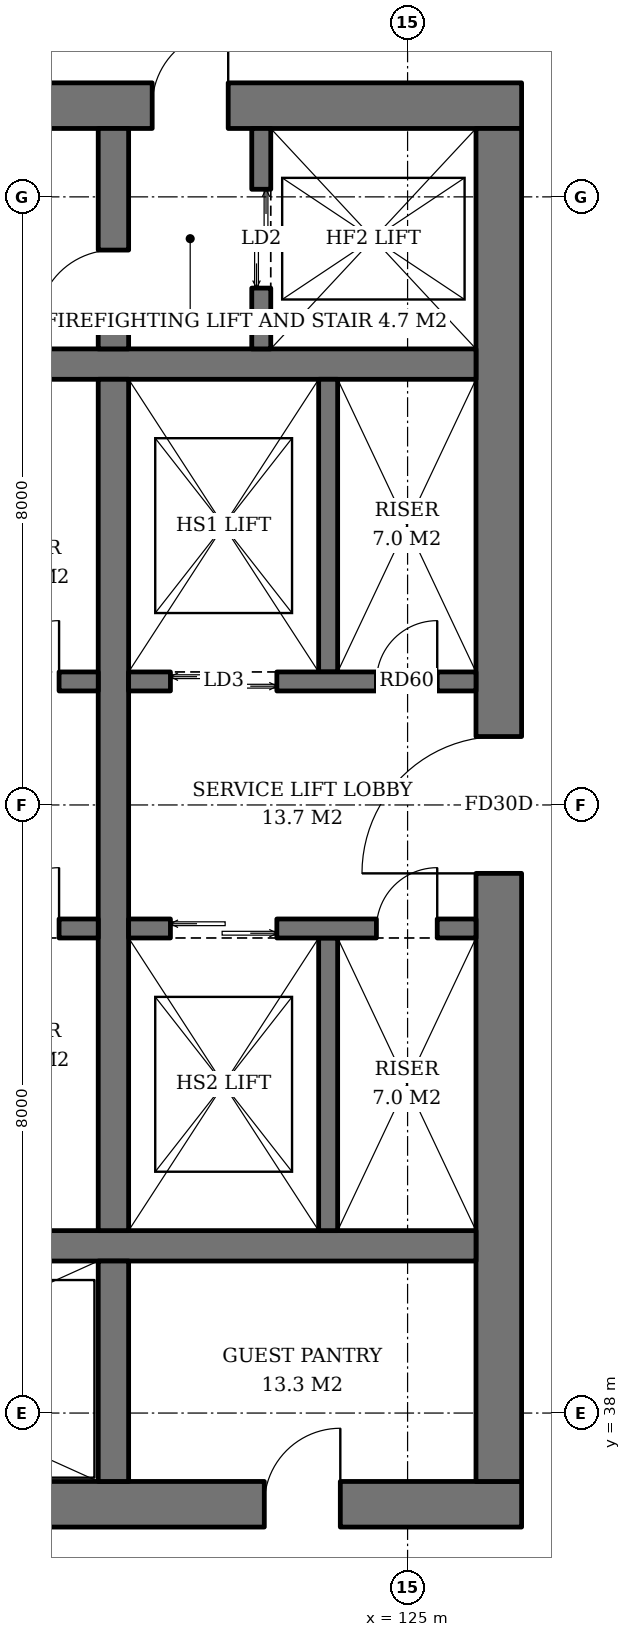
"""IFC4 building model, lengths in metres.
Left out: names, types, materials, properties, quantities, classifications, styles, units other than length and angle.
Written with IfcOpenShell. Run it as: python <this file> out.ifc"""

import sys

from ifc_helpers import new_model, si_unit, direction, frame, frame_2d, origin, place, context, subcontext, project, spatial, rectangle, extrude, element, fill, save


model = new_model("IFC4")
c1 = context("Model", 3, precision=1e-05, world=origin(), true_north=direction((0.0, 1.0)))
c2 = subcontext(c1, "Body", "Model", "MODEL_VIEW")
j1 = project(units=[si_unit("LENGTHUNIT", "METRE"), si_unit("PLANEANGLEUNIT", "RADIAN")], contexts=[c1])
p1 = place(None, origin())
s1 = spatial("IfcSite", under=j1, at=p1, CompositionType="ELEMENT")
p2 = place(p1, origin())
s2 = spatial("IfcBuilding", under=s1, at=p2, CompositionType="ELEMENT")
p3 = place(p2, frame((0.0, 0.0, 21.0)))
s3 = spatial("IfcBuildingStorey", under=s2, at=p3, CompositionType="ELEMENT", Elevation=21.0)
p4 = place(p3, frame((107.5, 36.8, 0.0), z_axis=(0.0, 0.0, 1.0), x_axis=(1.0, 0.0, 0.0)))
e1 = element("IfcWall", 1, at=p4, inside=s3, PredefinedType="SHEAR", context=c2, shape_type="SweptSolid", body=[
    extrude(rectangle(XDim=19.0, YDim=0.6, at=frame_2d((9.5, 0.0))), origin(), (0.0, 0.0, 1.0), 3.8),
])
p5 = place(p4, frame((3.9, 0.0, 0.0)))
e2 = element("IfcOpeningElement", 2, at=p5, cuts=e1, PredefinedType="OPENING", context=c2, shape_type="SweptSolid", body=[
    extrude(rectangle(XDim=1.0, YDim=2.1, at=frame_2d((0.5, 1.05))), frame((0.0, 0.31, 0.0), z_axis=(0.0, -1.0, 0.0), x_axis=(1.0, 0.0, 0.0)), (0.0, 0.0, 1.0), 0.62),
])
p6 = place(p4, frame((15.615, 0.0, 0.0)))
e3 = element("IfcOpeningElement", 3, at=p6, cuts=e1, PredefinedType="OPENING", context=c2, shape_type="SweptSolid", body=[
    extrude(rectangle(XDim=1.0, YDim=2.1, at=frame_2d((0.5, 1.05))), frame((0.0, 0.31, 0.0), z_axis=(0.0, -1.0, 0.0), x_axis=(1.0, 0.0, 0.0)), (0.0, 0.0, 1.0), 0.62),
])
p7 = place(p3, frame((107.5, 55.2, 0.0), z_axis=(0.0, 0.0, 1.0), x_axis=(1.0, 0.0, 0.0)))
e4 = element("IfcWall", 4, at=p7, inside=s3, PredefinedType="SHEAR", context=c2, shape_type="SweptSolid", body=[
    extrude(rectangle(XDim=19.0, YDim=0.6, at=frame_2d((9.5, 0.0))), origin(), (0.0, 0.0, 1.0), 3.8),
])
p8 = place(p7, frame((14.14, 0.0, 0.0)))
e5 = element("IfcOpeningElement", 5, at=p8, cuts=e4, PredefinedType="OPENING", context=c2, shape_type="SweptSolid", body=[
    extrude(rectangle(XDim=1.0, YDim=2.1, at=frame_2d((0.5, 1.05))), frame((0.0, 0.31, 0.0), z_axis=(0.0, -1.0, 0.0), x_axis=(1.0, 0.0, 0.0)), (0.0, 0.0, 1.0), 0.62),
])
p9 = place(p7, frame((1.675, 0.0, 0.0)))
e6 = element("IfcOpeningElement", 6, at=p9, cuts=e4, PredefinedType="OPENING", context=c2, shape_type="SweptSolid", body=[
    extrude(rectangle(XDim=1.0, YDim=2.1, at=frame_2d((0.5, 1.05))), frame((0.0, 0.31, 0.0), z_axis=(0.0, -1.0, 0.0), x_axis=(1.0, 0.0, 0.0)), (0.0, 0.0, 1.0), 0.62),
])
p10 = place(p7, frame((3.587, 0.0, 0.0)))
e7 = element("IfcOpeningElement", 7, at=p10, cuts=e4, PredefinedType="OPENING", context=c2, shape_type="SweptSolid", body=[
    extrude(rectangle(XDim=1.0, YDim=2.1, at=frame_2d((0.5, 1.05))), frame((0.0, 0.31, 0.0), z_axis=(0.0, -1.0, 0.0), x_axis=(1.0, 0.0, 0.0)), (0.0, 0.0, 1.0), 0.62),
])
p11 = place(p3, frame((126.2, 37.1, 0.0), z_axis=(0.0, 0.0, 1.0), x_axis=(0.0, 1.0, 0.0)))
e8 = element("IfcWall", 8, at=p11, inside=s3, PredefinedType="SHEAR", context=c2, shape_type="SweptSolid", body=[
    extrude(rectangle(XDim=17.8, YDim=0.6, at=frame_2d((8.9, 0.0))), origin(), (0.0, 0.0, 1.0), 3.8),
])
p12 = place(p11, frame((8.0, 0.0, 0.0)))
e9 = element("IfcOpeningElement", 9, at=p12, cuts=e8, PredefinedType="OPENING", context=c2, shape_type="SweptSolid", body=[
    extrude(rectangle(XDim=1.8, YDim=2.4, at=frame_2d((0.9, 1.2))), frame((0.0, 0.31, 0.0), z_axis=(0.0, -1.0, 0.0), x_axis=(1.0, 0.0, 0.0)), (0.0, 0.0, 1.0), 0.62),
])
for number, where, z_axis, x_axis in (
    (10, (108.1, 40.2, 0.0), (0.0, 0.0, 1.0), (1.0, 0.0, 0.0)),
    (11, (108.1, 51.8, 0.0), (0.0, 0.0, 1.0), (1.0, 0.0, 0.0)),
):
    element("IfcWall", number, at=place(p3, frame(where, z_axis=z_axis, x_axis=x_axis)), inside=s3, PredefinedType="SHEAR", context=c2, shape_type="SweptSolid", body=[
        extrude(rectangle(XDim=17.8, YDim=0.4, at=frame_2d((8.9, 0.0))), origin(), (0.0, 0.0, 1.0), 3.8),
    ])
p13 = place(p3, frame((121.13, 37.1, 0.0), z_axis=(0.0, 0.0, 1.0), x_axis=(0.0, 1.0, 0.0)))
e12 = element("IfcWall", 12, at=p13, inside=s3, PredefinedType="SHEAR", context=c2, shape_type="SweptSolid", body=[
    extrude(rectangle(XDim=2.9, YDim=0.4, at=frame_2d((1.45, 0.0))), origin(), (0.0, 0.0, 1.0), 3.8),
])
p14 = place(p3, frame((121.13, 40.4, 0.0), z_axis=(0.0, 0.0, 1.0), x_axis=(0.0, 1.0, 0.0)))
e13 = element("IfcWall", 13, at=p14, inside=s3, PredefinedType="SHEAR", context=c2, shape_type="SweptSolid", body=[
    extrude(rectangle(XDim=11.2, YDim=0.4, at=frame_2d((5.6, 0.0))), origin(), (0.0, 0.0, 1.0), 3.8),
])
p15 = place(p3, frame((121.13, 52.0, 0.0), z_axis=(0.0, 0.0, 1.0), x_axis=(0.0, 1.0, 0.0)))
e14 = element("IfcWall", 14, at=p15, inside=s3, PredefinedType="SHEAR", context=c2, shape_type="SweptSolid", body=[
    extrude(rectangle(XDim=2.9, YDim=0.4, at=frame_2d((1.45, 0.0))), origin(), (0.0, 0.0, 1.0), 3.8),
])
p16 = place(p15, frame((0.3, 0.0, 0.0)))
e15 = element("IfcOpeningElement", 15, at=p16, cuts=e14, PredefinedType="OPENING", context=c2, shape_type="SweptSolid", body=[
    extrude(rectangle(XDim=1.0, YDim=2.1, at=frame_2d((0.5, 1.05))), frame((0.0, 0.21, 0.0), z_axis=(0.0, -1.0, 0.0), x_axis=(1.0, 0.0, 0.0)), (0.0, 0.0, 1.0), 0.42),
])
p17 = place(p3, frame((123.075, 52.0, 0.0), z_axis=(0.0, 0.0, 1.0), x_axis=(0.0, 1.0, 0.0)))
e16 = element("IfcWall", 16, at=p17, inside=s3, PredefinedType="SHEAR", context=c2, shape_type="SweptSolid", body=[
    extrude(rectangle(XDim=2.9, YDim=0.25, at=frame_2d((1.45, 0.0))), origin(), (0.0, 0.0, 1.0), 3.8),
])
p18 = place(p17, frame((0.8, 0.0, 0.0)))
e17 = element("IfcOpeningElement", 17, at=p18, cuts=e16, PredefinedType="OPENING", context=c2, shape_type="SweptSolid", body=[
    extrude(rectangle(XDim=1.3, YDim=2.2, at=frame_2d((0.65, 1.1))), frame((0.0, 0.135, 0.0), z_axis=(0.0, -1.0, 0.0), x_axis=(1.0, 0.0, 0.0)), (0.0, 0.0, 1.0), 0.27),
])
p19 = place(p3, frame((108.1, 47.625, 0.0), z_axis=(0.0, 0.0, 1.0), x_axis=(1.0, 0.0, 0.0)))
e18 = element("IfcWall", 18, at=p19, inside=s3, PredefinedType="SHEAR", context=c2, shape_type="SweptSolid", body=[
    extrude(rectangle(XDim=12.83, YDim=0.25, at=frame_2d((6.415, 0.0))), origin(), (0.0, 0.0, 1.0), 3.8),
])
p20 = place(p19, frame((0.7, 0.0, 0.0)))
e19 = element("IfcOpeningElement", 19, at=p20, cuts=e18, PredefinedType="OPENING", context=c2, shape_type="SweptSolid", body=[
    extrude(rectangle(XDim=1.1, YDim=2.2, at=frame_2d((0.55, 1.1))), frame((0.0, 0.135, 0.0), z_axis=(0.0, -1.0, 0.0), x_axis=(1.0, 0.0, 0.0)), (0.0, 0.0, 1.0), 0.27),
])
p21 = place(p19, frame((3.45, 0.0, 0.0)))
e20 = element("IfcOpeningElement", 20, at=p21, cuts=e18, PredefinedType="OPENING", context=c2, shape_type="SweptSolid", body=[
    extrude(rectangle(XDim=1.1, YDim=2.2, at=frame_2d((0.55, 1.1))), frame((0.0, 0.135, 0.0), z_axis=(0.0, -1.0, 0.0), x_axis=(1.0, 0.0, 0.0)), (0.0, 0.0, 1.0), 0.27),
])
p22 = place(p19, frame((6.2, 0.0, 0.0)))
e21 = element("IfcOpeningElement", 21, at=p22, cuts=e18, PredefinedType="OPENING", context=c2, shape_type="SweptSolid", body=[
    extrude(rectangle(XDim=1.1, YDim=2.2, at=frame_2d((0.55, 1.1))), frame((0.0, 0.135, 0.0), z_axis=(0.0, -1.0, 0.0), x_axis=(1.0, 0.0, 0.0)), (0.0, 0.0, 1.0), 0.27),
])
p23 = place(p19, frame((8.95, 0.0, 0.0)))
e22 = element("IfcOpeningElement", 22, at=p23, cuts=e18, PredefinedType="OPENING", context=c2, shape_type="SweptSolid", body=[
    extrude(rectangle(XDim=1.1, YDim=2.2, at=frame_2d((0.55, 1.1))), frame((0.0, 0.135, 0.0), z_axis=(0.0, -1.0, 0.0), x_axis=(1.0, 0.0, 0.0)), (0.0, 0.0, 1.0), 0.27),
])
p24 = place(p19, frame((11.515, 0.0, 0.0)))
e23 = element("IfcOpeningElement", 23, at=p24, cuts=e18, PredefinedType="OPENING", context=c2, shape_type="SweptSolid", body=[
    extrude(rectangle(XDim=0.8, YDim=2.0, at=frame_2d((0.4, 1.0))), frame((0.0, 0.135, 0.0), z_axis=(0.0, -1.0, 0.0), x_axis=(1.0, 0.0, 0.0)), (0.0, 0.0, 1.0), 0.27),
])
p25 = place(p3, frame((108.1, 44.375, 0.0), z_axis=(0.0, 0.0, 1.0), x_axis=(1.0, 0.0, 0.0)))
e24 = element("IfcWall", 24, at=p25, inside=s3, PredefinedType="SHEAR", context=c2, shape_type="SweptSolid", body=[
    extrude(rectangle(XDim=12.83, YDim=0.25, at=frame_2d((6.415, 0.0))), origin(), (0.0, 0.0, 1.0), 3.8),
])
p26 = place(p25, frame((0.7, 0.0, 0.0)))
e25 = element("IfcOpeningElement", 25, at=p26, cuts=e24, PredefinedType="OPENING", context=c2, shape_type="SweptSolid", body=[
    extrude(rectangle(XDim=1.1, YDim=2.2, at=frame_2d((0.55, 1.1))), frame((0.0, 0.135, 0.0), z_axis=(0.0, -1.0, 0.0), x_axis=(1.0, 0.0, 0.0)), (0.0, 0.0, 1.0), 0.27),
])
p27 = place(p25, frame((3.45, 0.0, 0.0)))
e26 = element("IfcOpeningElement", 26, at=p27, cuts=e24, PredefinedType="OPENING", context=c2, shape_type="SweptSolid", body=[
    extrude(rectangle(XDim=1.1, YDim=2.2, at=frame_2d((0.55, 1.1))), frame((0.0, 0.135, 0.0), z_axis=(0.0, -1.0, 0.0), x_axis=(1.0, 0.0, 0.0)), (0.0, 0.0, 1.0), 0.27),
])
p28 = place(p25, frame((6.2, 0.0, 0.0)))
e27 = element("IfcOpeningElement", 27, at=p28, cuts=e24, PredefinedType="OPENING", context=c2, shape_type="SweptSolid", body=[
    extrude(rectangle(XDim=1.1, YDim=2.2, at=frame_2d((0.55, 1.1))), frame((0.0, 0.135, 0.0), z_axis=(0.0, -1.0, 0.0), x_axis=(1.0, 0.0, 0.0)), (0.0, 0.0, 1.0), 0.27),
])
p29 = place(p25, frame((9.0, 0.0, 0.0)))
e28 = element("IfcOpeningElement", 28, at=p29, cuts=e24, PredefinedType="OPENING", context=c2, shape_type="SweptSolid", body=[
    extrude(rectangle(XDim=1.0, YDim=2.1, at=frame_2d((0.5, 1.05))), frame((0.0, 0.135, 0.0), z_axis=(0.0, -1.0, 0.0), x_axis=(1.0, 0.0, 0.0)), (0.0, 0.0, 1.0), 0.27),
])
p30 = place(p25, frame((11.515, 0.0, 0.0)))
e29 = element("IfcOpeningElement", 29, at=p30, cuts=e24, PredefinedType="OPENING", context=c2, shape_type="SweptSolid", body=[
    extrude(rectangle(XDim=0.8, YDim=2.0, at=frame_2d((0.4, 1.0))), frame((0.0, 0.135, 0.0), z_axis=(0.0, -1.0, 0.0), x_axis=(1.0, 0.0, 0.0)), (0.0, 0.0, 1.0), 0.27),
])
p31 = place(p3, frame((123.955, 47.75, 0.0), z_axis=(0.0, 0.0, 1.0), x_axis=(0.0, 1.0, 0.0)))
e30 = element("IfcWall", 30, at=p31, inside=s3, PredefinedType="SHEAR", context=c2, shape_type="SweptSolid", body=[
    extrude(rectangle(XDim=3.85, YDim=0.25, at=frame_2d((1.925, 0.0))), origin(), (0.0, 0.0, 1.0), 3.8),
])
p32 = place(p3, frame((121.33, 47.625, 0.0), z_axis=(0.0, 0.0, 1.0), x_axis=(1.0, 0.0, 0.0)))
e31 = element("IfcWall", 31, at=p32, inside=s3, PredefinedType="SHEAR", context=c2, shape_type="SweptSolid", body=[
    extrude(rectangle(XDim=4.57, YDim=0.25, at=frame_2d((2.285, 0.0))), origin(), (0.0, 0.0, 1.0), 3.8),
])
p33 = place(p32, frame((0.55, 0.0, 0.0)))
e32 = element("IfcOpeningElement", 32, at=p33, cuts=e31, PredefinedType="OPENING", context=c2, shape_type="SweptSolid", body=[
    extrude(rectangle(XDim=1.4, YDim=2.4, at=frame_2d((0.7, 1.2))), frame((0.0, 0.135, 0.0), z_axis=(0.0, -1.0, 0.0), x_axis=(1.0, 0.0, 0.0)), (0.0, 0.0, 1.0), 0.27),
])
p34 = place(p32, frame((3.26, 0.0, 0.0)))
e33 = element("IfcOpeningElement", 33, at=p34, cuts=e31, PredefinedType="OPENING", context=c2, shape_type="SweptSolid", body=[
    extrude(rectangle(XDim=0.8, YDim=2.0, at=frame_2d((0.4, 1.0))), frame((0.0, 0.135, 0.0), z_axis=(0.0, -1.0, 0.0), x_axis=(1.0, 0.0, 0.0)), (0.0, 0.0, 1.0), 0.27),
])
p35 = place(p3, frame((123.955, 44.25, 0.0), z_axis=(0.0, 0.0, 1.0), x_axis=(0.0, -1.0, 0.0)))
e34 = element("IfcWall", 34, at=p35, inside=s3, PredefinedType="SHEAR", context=c2, shape_type="SweptSolid", body=[
    extrude(rectangle(XDim=3.85, YDim=0.25, at=frame_2d((1.925, 0.0))), origin(), (0.0, 0.0, 1.0), 3.8),
])
p36 = place(p3, frame((121.33, 44.375, 0.0), z_axis=(0.0, 0.0, 1.0), x_axis=(1.0, 0.0, 0.0)))
e35 = element("IfcWall", 35, at=p36, inside=s3, PredefinedType="SHEAR", context=c2, shape_type="SweptSolid", body=[
    extrude(rectangle(XDim=4.57, YDim=0.25, at=frame_2d((2.285, 0.0))), origin(), (0.0, 0.0, 1.0), 3.8),
])
p37 = place(p36, frame((0.55, 0.0, 0.0)))
e36 = element("IfcOpeningElement", 36, at=p37, cuts=e35, PredefinedType="OPENING", context=c2, shape_type="SweptSolid", body=[
    extrude(rectangle(XDim=1.4, YDim=2.4, at=frame_2d((0.7, 1.2))), frame((0.0, 0.135, 0.0), z_axis=(0.0, -1.0, 0.0), x_axis=(1.0, 0.0, 0.0)), (0.0, 0.0, 1.0), 0.27),
])
p38 = place(p36, frame((3.26, 0.0, 0.0)))
e37 = element("IfcOpeningElement", 37, at=p38, cuts=e35, PredefinedType="OPENING", context=c2, shape_type="SweptSolid", body=[
    extrude(rectangle(XDim=0.8, YDim=2.0, at=frame_2d((0.4, 1.0))), frame((0.0, 0.135, 0.0), z_axis=(0.0, -1.0, 0.0), x_axis=(1.0, 0.0, 0.0)), (0.0, 0.0, 1.0), 0.27),
])
p39 = place(p18, origin())
e38 = element("IfcDoor", 38, at=p39, inside=s3, OperationType="DOUBLE_DOOR_SLIDING", PredefinedType="DOOR", context=c2, shape_type="SweptSolid", body=[
    extrude(rectangle(XDim=1.3, YDim=2.2, at=frame_2d((0.65, 1.1))), frame((0.0, 0.025, 0.0), z_axis=(0.0, -1.0, 0.0), x_axis=(1.0, 0.0, 0.0)), (0.0, 0.0, 1.0), 0.05),
])
fill(e17, e38)
p40 = place(p24, origin())
e39 = element("IfcDoor", 39, at=p40, inside=s3, OperationType="SINGLE_SWING_RIGHT", PredefinedType="DOOR", context=c2, shape_type="SweptSolid", body=[
    extrude(rectangle(XDim=0.8, YDim=2.0, at=frame_2d((0.4, 1.0))), frame((0.0, 0.025, 0.0), z_axis=(0.0, -1.0, 0.0), x_axis=(1.0, 0.0, 0.0)), (0.0, 0.0, 1.0), 0.05),
])
fill(e23, e39)
p41 = place(p30, origin())
e40 = element("IfcDoor", 40, at=p41, inside=s3, OperationType="SINGLE_SWING_RIGHT", PredefinedType="DOOR", context=c2, shape_type="SweptSolid", body=[
    extrude(rectangle(XDim=0.8, YDim=2.0, at=frame_2d((0.4, 1.0))), frame((0.0, 0.025, 0.0), z_axis=(0.0, -1.0, 0.0), x_axis=(1.0, 0.0, 0.0)), (0.0, 0.0, 1.0), 0.05),
])
fill(e29, e40)
p42 = place(p33, origin())
e41 = element("IfcDoor", 41, at=p42, inside=s3, OperationType="DOUBLE_DOOR_SLIDING", PredefinedType="DOOR", context=c2, shape_type="SweptSolid", body=[
    extrude(rectangle(XDim=1.4, YDim=2.4, at=frame_2d((0.7, 1.2))), frame((0.0, 0.025, 0.0), z_axis=(0.0, -1.0, 0.0), x_axis=(1.0, 0.0, 0.0)), (0.0, 0.0, 1.0), 0.05),
])
fill(e32, e41)
p43 = place(p34, origin())
e42 = element("IfcDoor", 42, at=p43, inside=s3, OperationType="SINGLE_SWING_RIGHT", PredefinedType="DOOR", context=c2, shape_type="SweptSolid", body=[
    extrude(rectangle(XDim=0.8, YDim=2.0, at=frame_2d((0.4, 1.0))), frame((0.0, 0.025, 0.0), z_axis=(0.0, -1.0, 0.0), x_axis=(1.0, 0.0, 0.0)), (0.0, 0.0, 1.0), 0.05),
])
fill(e33, e42)
p44 = place(p37, origin())
e43 = element("IfcDoor", 43, at=p44, inside=s3, OperationType="DOUBLE_DOOR_SLIDING", PredefinedType="DOOR", context=c2, shape_type="SweptSolid", body=[
    extrude(rectangle(XDim=1.4, YDim=2.4, at=frame_2d((0.7, 1.2))), frame((0.0, 0.025, 0.0), z_axis=(0.0, -1.0, 0.0), x_axis=(1.0, 0.0, 0.0)), (0.0, 0.0, 1.0), 0.05),
])
fill(e36, e43)
p45 = place(p38, origin())
e44 = element("IfcDoor", 44, at=p45, inside=s3, OperationType="SINGLE_SWING_RIGHT", PredefinedType="DOOR", context=c2, shape_type="SweptSolid", body=[
    extrude(rectangle(XDim=0.8, YDim=2.0, at=frame_2d((0.4, 1.0))), frame((0.0, 0.025, 0.0), z_axis=(0.0, -1.0, 0.0), x_axis=(1.0, 0.0, 0.0)), (0.0, 0.0, 1.0), 0.05),
])
fill(e37, e44)
p46 = place(p16, origin())
e45 = element("IfcDoor", 45, at=p46, inside=s3, OperationType="SINGLE_SWING_LEFT", PredefinedType="DOOR", context=c2, shape_type="SweptSolid", body=[
    extrude(rectangle(XDim=1.0, YDim=2.1, at=frame_2d((0.5, 1.05))), frame((0.0, 0.025, 0.0), z_axis=(0.0, -1.0, 0.0), x_axis=(1.0, 0.0, 0.0)), (0.0, 0.0, 1.0), 0.05),
])
fill(e15, e45)
p47 = place(p8, origin())
e46 = element("IfcDoor", 46, at=p47, inside=s3, OperationType="SINGLE_SWING_RIGHT", PredefinedType="DOOR", context=c2, shape_type="SweptSolid", body=[
    extrude(rectangle(XDim=1.0, YDim=2.1, at=frame_2d((0.5, 1.05))), frame((0.0, 0.025, 0.0), z_axis=(0.0, -1.0, 0.0), x_axis=(1.0, 0.0, 0.0)), (0.0, 0.0, 1.0), 0.05),
])
fill(e5, e46)
p48 = place(p12, origin())
e47 = element("IfcDoor", 47, at=p48, inside=s3, OperationType="DOUBLE_DOOR_SINGLE_SWING", PredefinedType="DOOR", context=c2, shape_type="SweptSolid", body=[
    extrude(rectangle(XDim=1.8, YDim=2.4, at=frame_2d((0.9, 1.2))), frame((0.0, 0.025, 0.0), z_axis=(0.0, -1.0, 0.0), x_axis=(1.0, 0.0, 0.0)), (0.0, 0.0, 1.0), 0.05),
])
fill(e9, e47)
p49 = place(p6, origin())
e48 = element("IfcDoor", 48, at=p49, inside=s3, OperationType="SINGLE_SWING_RIGHT", PredefinedType="DOOR", context=c2, shape_type="SweptSolid", body=[
    extrude(rectangle(XDim=1.0, YDim=2.1, at=frame_2d((0.5, 1.05))), frame((0.0, 0.29, 0.0), z_axis=(0.0, -1.0, 0.0), x_axis=(1.0, 0.0, 0.0)), (0.0, 0.0, 1.0), 0.05),
])
fill(e3, e48)
save(model, sys.argv[1])
